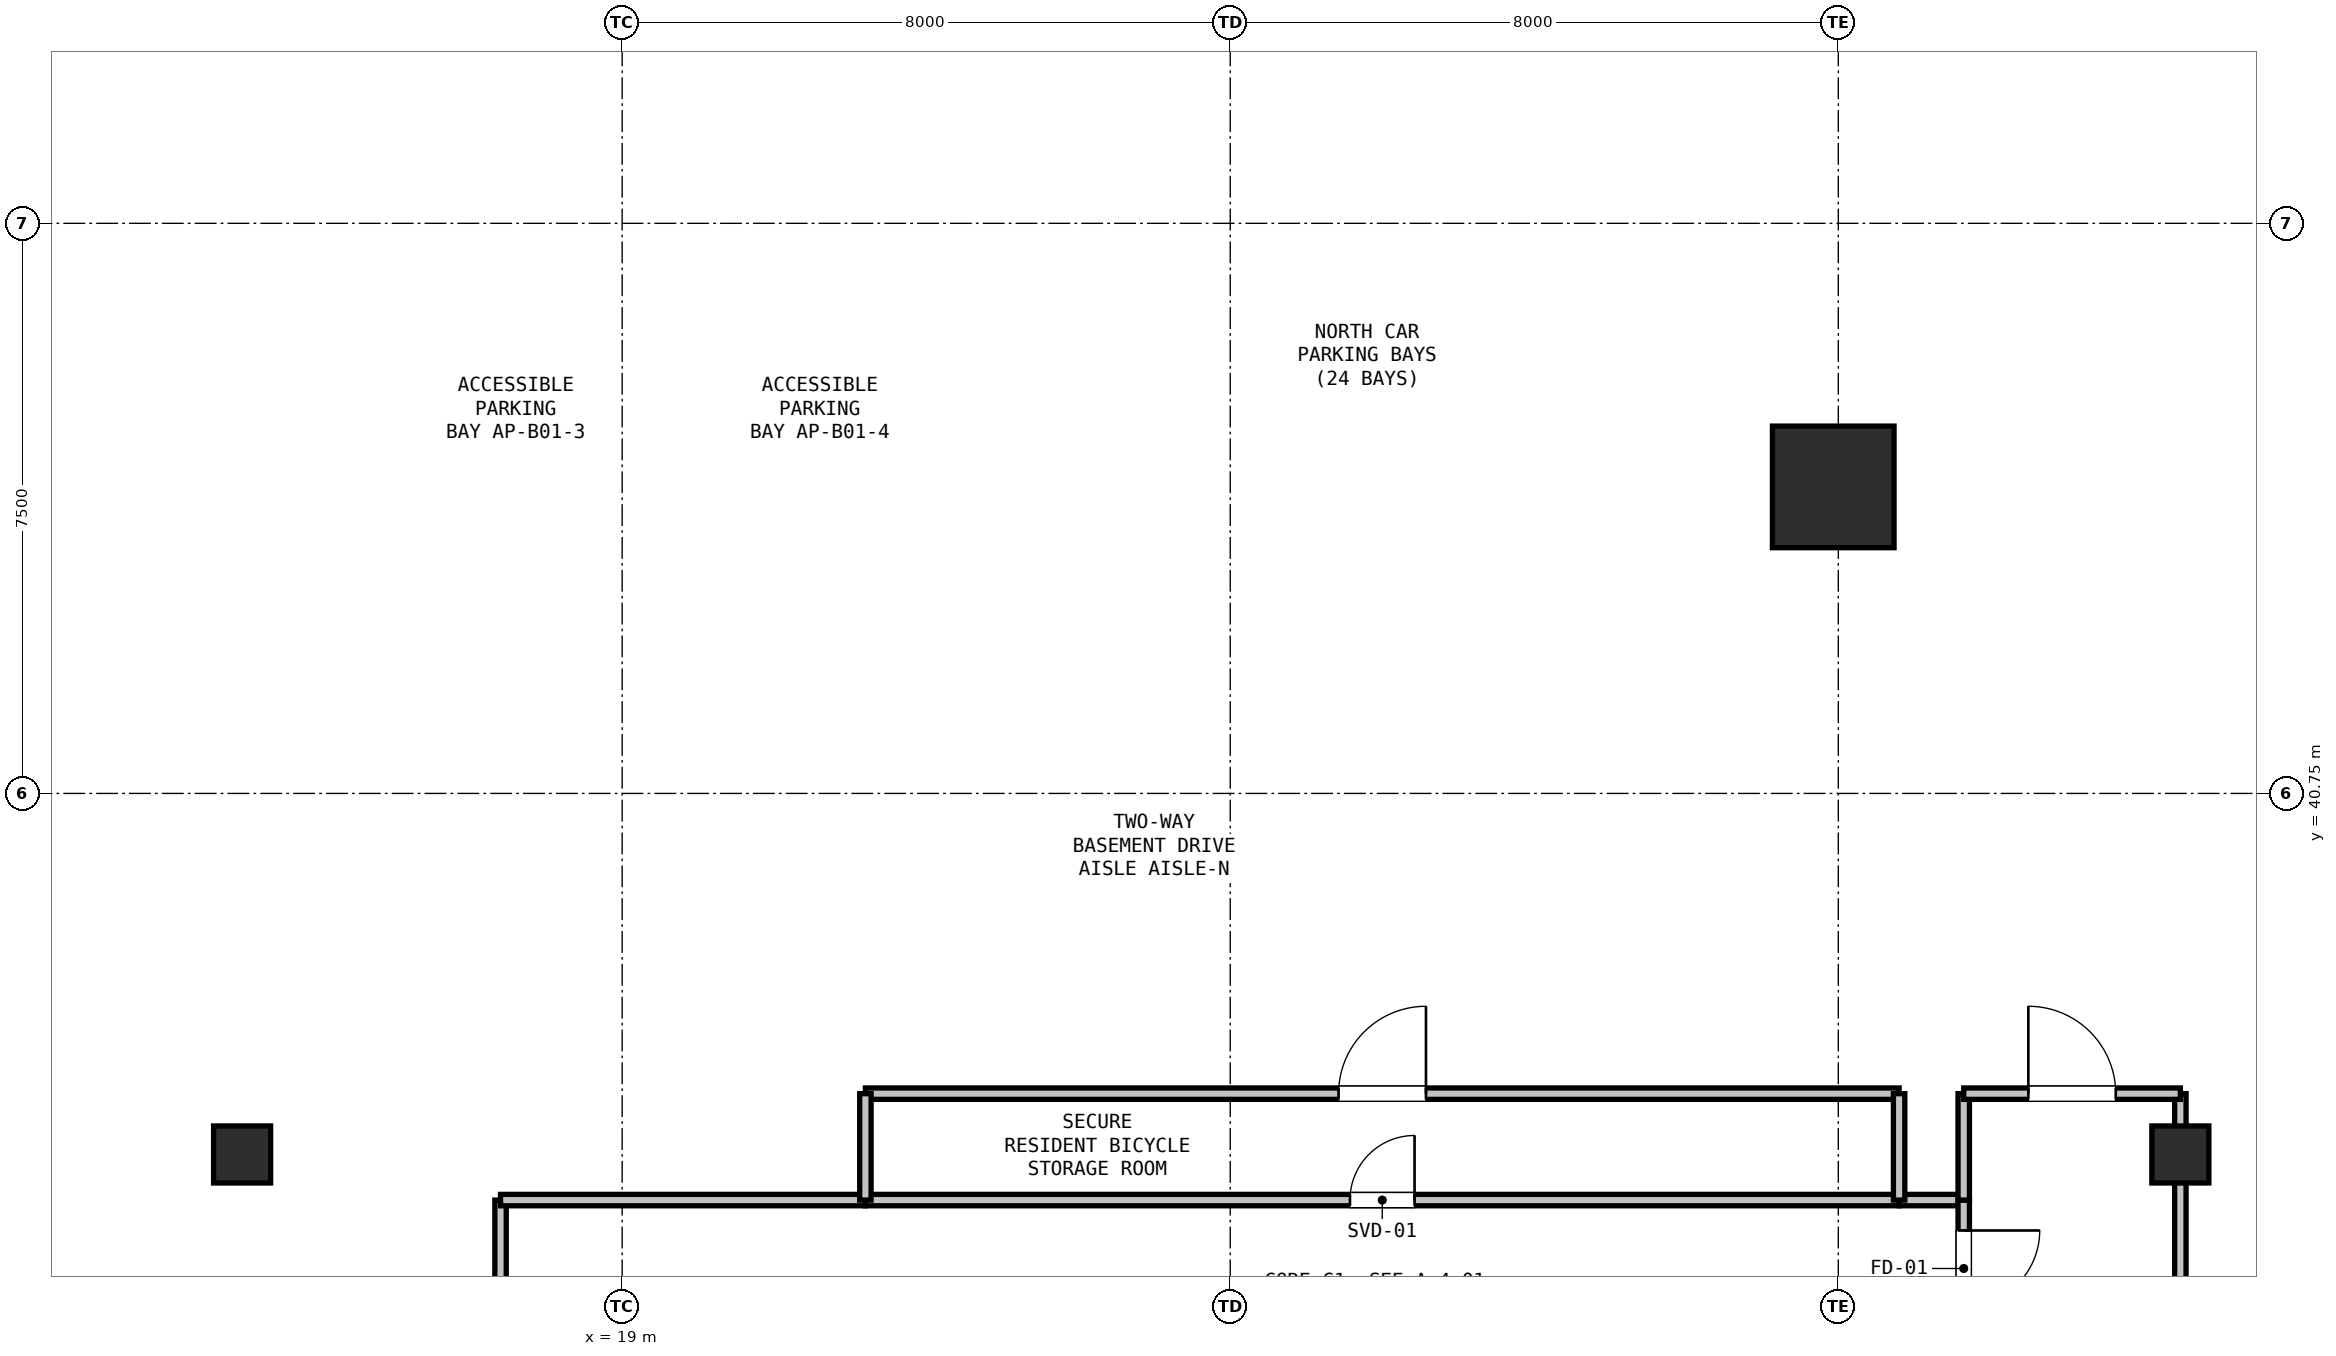
"""IFC4 building model, lengths in metres.
Left out: names, types, materials, properties, quantities, classifications, styles, units other than length and angle.
Written with IfcOpenShell. Run it as: python <this file> out.ifc"""

import sys

from ifc_helpers import new_model, si_unit, direction, frame, frame_2d, origin, origin_2d, place, context, subcontext, project, spatial, rectangle, hollow_rectangle, extrude, element, fill, save


model = new_model("IFC4")
c1 = context("Model", 3, precision=1e-05, world=origin(), true_north=direction((0.0, 1.0)))
c2 = subcontext(c1, "Body", "Model", "MODEL_VIEW")
j1 = project(units=[si_unit("LENGTHUNIT", "METRE"), si_unit("PLANEANGLEUNIT", "RADIAN")], contexts=[c1])
p1 = place(None, origin())
s1 = spatial("IfcSite", under=j1, at=p1, CompositionType="ELEMENT")
p2 = place(p1, origin())
s2 = spatial("IfcBuilding", under=s1, at=p2, CompositionType="ELEMENT")
p3 = place(p2, frame((0.0, 0.0, -4.5)))
s3 = spatial("IfcBuildingStorey", under=s2, at=p3, CompositionType="ELEMENT", Elevation=-4.5)
p4 = place(p3, frame((34.933, 44.783, 0.0), z_axis=(0.0, 0.0, 1.0), x_axis=(1.0, 0.0, 0.0)))
e1 = element("IfcColumn", 1, at=p4, inside=s3, PredefinedType="COLUMN", context=c2, shape_type="SweptSolid", body=[
    extrude(hollow_rectangle(XDim=1.6, YDim=1.6, WallThickness=0.04, at=origin_2d()), origin(), (0.0, 0.0, 1.0), 4.5),
])
for number, where, z_axis, x_axis in (
    (2, (14.0, 36.0, 0.0), (0.0, 0.0, 1.0), (1.0, 0.0, 0.0)),
    (3, (39.5, 36.0, 0.0), (0.0, 0.0, 1.0), (1.0, 0.0, 0.0)),
):
    element("IfcColumn", number, at=place(p3, frame(where, z_axis=z_axis, x_axis=x_axis)), inside=s3, PredefinedType="COLUMN", context=c2, shape_type="SweptSolid", body=[
        extrude(rectangle(XDim=0.75, YDim=0.75, at=origin_2d()), origin(), (0.0, 0.0, 1.0), 4.5),
    ])
p5 = place(p3, frame((17.4, 16.7, 0.0), z_axis=(0.0, 0.0, 1.0), x_axis=(0.0, 1.0, 0.0)))
e4 = element("IfcWall", 4, at=p5, inside=s3, PredefinedType="PARTITIONING", context=c2, shape_type="SweptSolid", body=[
    extrude(rectangle(XDim=18.7, YDim=0.15, at=frame_2d((9.35, 0.0))), origin(), (0.0, 0.0, 1.0), 4.2),
])
p6 = place(p5, frame((1.725, 0.0, 0.0)))
e5 = element("IfcOpeningElement", 5, at=p6, cuts=e4, PredefinedType="OPENING", context=c2, shape_type="SweptSolid", body=[
    extrude(rectangle(XDim=1.15, YDim=2.15, at=frame_2d((0.575, 1.075))), frame((0.0, 0.085, 0.0), z_axis=(0.0, -1.0, 0.0), x_axis=(1.0, 0.0, 0.0)), (0.0, 0.0, 1.0), 0.17),
])
p7 = place(p5, frame((5.347, 0.0, 0.0)))
e6 = element("IfcOpeningElement", 6, at=p7, cuts=e4, PredefinedType="OPENING", context=c2, shape_type="SweptSolid", body=[
    extrude(rectangle(XDim=1.15, YDim=2.15, at=frame_2d((0.575, 1.075))), frame((0.0, 0.085, 0.0), z_axis=(0.0, -1.0, 0.0), x_axis=(1.0, 0.0, 0.0)), (0.0, 0.0, 1.0), 0.17),
])
p8 = place(p3, frame((17.4, 35.4, 0.0), z_axis=(0.0, 0.0, 1.0), x_axis=(1.0, 0.0, 0.0)))
e7 = element("IfcWall", 7, at=p8, inside=s3, PredefinedType="PARTITIONING", context=c2, shape_type="SweptSolid", body=[
    extrude(rectangle(XDim=4.8, YDim=0.15, at=frame_2d((2.4, 0.0))), origin(), (0.0, 0.0, 1.0), 4.2),
])
p9 = place(p3, frame((22.2, 35.4, 0.0), z_axis=(0.0, 0.0, 1.0), x_axis=(1.0, 0.0, 0.0)))
e8 = element("IfcWall", 8, at=p9, inside=s3, PredefinedType="PARTITIONING", context=c2, shape_type="SweptSolid", body=[
    extrude(rectangle(XDim=13.6, YDim=0.15, at=frame_2d((6.8, 0.0))), origin(), (0.0, 0.0, 1.0), 4.2),
])
p10 = place(p9, frame((6.375, 0.0, 0.0)))
e9 = element("IfcOpeningElement", 9, at=p10, cuts=e8, PredefinedType="OPENING", context=c2, shape_type="SweptSolid", body=[
    extrude(rectangle(XDim=0.85, YDim=2.1, at=frame_2d((0.425, 1.05))), frame((0.0, 0.085, 0.0), z_axis=(0.0, -1.0, 0.0), x_axis=(1.0, 0.0, 0.0)), (0.0, 0.0, 1.0), 0.17),
])
p11 = place(p3, frame((35.8, 35.4, 0.0), z_axis=(0.0, 0.0, 1.0), x_axis=(1.0, 0.0, 0.0)))
e10 = element("IfcWall", 10, at=p11, inside=s3, PredefinedType="PARTITIONING", context=c2, shape_type="SweptSolid", body=[
    extrude(rectangle(XDim=0.85, YDim=0.15, at=frame_2d((0.425, 0.0))), origin(), (0.0, 0.0, 1.0), 4.2),
])
p12 = place(p3, frame((36.65, 35.4, 0.0), z_axis=(0.0, 0.0, 1.0), x_axis=(0.0, -1.0, 0.0)))
e11 = element("IfcWall", 11, at=p12, inside=s3, PredefinedType="PARTITIONING", context=c2, shape_type="SweptSolid", body=[
    extrude(rectangle(XDim=1.8, YDim=0.15, at=frame_2d((0.9, 0.0))), origin(), (0.0, 0.0, 1.0), 4.2),
])
p13 = place(p12, frame((0.4, 0.0, 0.0)))
e12 = element("IfcOpeningElement", 12, at=p13, cuts=e11, PredefinedType="OPENING", context=c2, shape_type="SweptSolid", body=[
    extrude(rectangle(XDim=1.0, YDim=2.15, at=frame_2d((0.5, 1.075))), frame((0.0, 0.085, 0.0), z_axis=(0.0, -1.0, 0.0), x_axis=(1.0, 0.0, 0.0)), (0.0, 0.0, 1.0), 0.17),
])
p14 = place(p3, frame((39.5, 36.8, 0.0), z_axis=(0.0, 0.0, 1.0), x_axis=(0.0, -1.0, 0.0)))
e13 = element("IfcWall", 13, at=p14, inside=s3, PredefinedType="PARTITIONING", context=c2, shape_type="SweptSolid", body=[
    extrude(rectangle(XDim=20.1, YDim=0.15, at=frame_2d((10.05, 0.0))), origin(), (0.0, 0.0, 1.0), 4.2),
])
p15 = place(p14, frame((10.884, 0.0, 0.0)))
e14 = element("IfcOpeningElement", 14, at=p15, cuts=e13, PredefinedType="OPENING", context=c2, shape_type="SweptSolid", body=[
    extrude(rectangle(XDim=1.15, YDim=2.15, at=frame_2d((0.575, 1.075))), frame((0.0, 0.085, 0.0), z_axis=(0.0, -1.0, 0.0), x_axis=(1.0, 0.0, 0.0)), (0.0, 0.0, 1.0), 0.17),
])
p16 = place(p3, frame((36.65, 35.4, 0.0), z_axis=(0.0, 0.0, 1.0), x_axis=(0.0, 1.0, 0.0)))
e15 = element("IfcWall", 15, at=p16, inside=s3, PredefinedType="PARTITIONING", context=c2, shape_type="SweptSolid", body=[
    extrude(rectangle(XDim=1.4, YDim=0.15, at=frame_2d((0.7, 0.0))), origin(), (0.0, 0.0, 1.0), 4.2),
])
p17 = place(p3, frame((36.65, 36.8, 0.0), z_axis=(0.0, 0.0, 1.0), x_axis=(1.0, 0.0, 0.0)))
e16 = element("IfcWall", 16, at=p17, inside=s3, PredefinedType="PARTITIONING", context=c2, shape_type="SweptSolid", body=[
    extrude(rectangle(XDim=2.85, YDim=0.15, at=frame_2d((1.425, 0.0))), origin(), (0.0, 0.0, 1.0), 4.2),
])
p18 = place(p17, frame((0.85, 0.0, 0.0)))
e17 = element("IfcOpeningElement", 17, at=p18, cuts=e16, PredefinedType="OPENING", context=c2, shape_type="SweptSolid", body=[
    extrude(rectangle(XDim=1.15, YDim=2.15, at=frame_2d((0.575, 1.075))), frame((0.0, 0.085, 0.0), z_axis=(0.0, -1.0, 0.0), x_axis=(1.0, 0.0, 0.0)), (0.0, 0.0, 1.0), 0.17),
])
p19 = place(p3, frame((22.2, 36.8, 0.0), z_axis=(0.0, 0.0, 1.0), x_axis=(1.0, 0.0, 0.0)))
e18 = element("IfcWall", 18, at=p19, inside=s3, PredefinedType="PARTITIONING", context=c2, shape_type="SweptSolid", body=[
    extrude(rectangle(XDim=13.6, YDim=0.15, at=frame_2d((6.8, 0.0))), origin(), (0.0, 0.0, 1.0), 4.2),
])
p20 = place(p19, frame((6.225, 0.0, 0.0)))
e19 = element("IfcOpeningElement", 19, at=p20, cuts=e18, PredefinedType="OPENING", context=c2, shape_type="SweptSolid", body=[
    extrude(rectangle(XDim=1.15, YDim=2.15, at=frame_2d((0.575, 1.075))), frame((0.0, 0.085, 0.0), z_axis=(0.0, -1.0, 0.0), x_axis=(1.0, 0.0, 0.0)), (0.0, 0.0, 1.0), 0.17),
])
for number, where, z_axis, x_axis in (
    (20, (35.8, 36.8, 0.0), (0.0, 0.0, 1.0), (0.0, -1.0, 0.0)),
    (21, (22.2, 35.4, 0.0), (0.0, 0.0, 1.0), (0.0, 1.0, 0.0)),
):
    element("IfcWall", number, at=place(p3, frame(where, z_axis=z_axis, x_axis=x_axis)), inside=s3, PredefinedType="PARTITIONING", context=c2, shape_type="SweptSolid", body=[
        extrude(rectangle(XDim=1.4, YDim=0.15, at=frame_2d((0.7, 0.0))), origin(), (0.0, 0.0, 1.0), 4.2),
    ])
p21 = place(p13, origin())
e22 = element("IfcDoor", 22, at=p21, inside=s3, OperationType="SINGLE_SWING_LEFT", PredefinedType="DOOR", context=c2, shape_type="SweptSolid", body=[
    extrude(rectangle(XDim=1.0, YDim=2.15, at=frame_2d((0.5, 1.075))), frame((0.0, 0.025, 0.0), z_axis=(0.0, -1.0, 0.0), x_axis=(1.0, 0.0, 0.0)), (0.0, 0.0, 1.0), 0.05),
])
fill(e12, e22)
p22 = place(p10, origin())
e23 = element("IfcDoor", 23, at=p22, inside=s3, OperationType="SINGLE_SWING_RIGHT", PredefinedType="DOOR", context=c2, shape_type="SweptSolid", body=[
    extrude(rectangle(XDim=0.85, YDim=2.1, at=frame_2d((0.425, 1.05))), frame((0.0, 0.025, 0.0), z_axis=(0.0, -1.0, 0.0), x_axis=(1.0, 0.0, 0.0)), (0.0, 0.0, 1.0), 0.05),
])
fill(e9, e23)
p23 = place(p18, origin())
e24 = element("IfcDoor", 24, at=p23, inside=s3, OperationType="SINGLE_SWING_LEFT", PredefinedType="DOOR", context=c2, shape_type="SweptSolid", body=[
    extrude(rectangle(XDim=1.15, YDim=2.15, at=frame_2d((0.575, 1.075))), frame((0.0, 0.025, 0.0), z_axis=(0.0, -1.0, 0.0), x_axis=(1.0, 0.0, 0.0)), (0.0, 0.0, 1.0), 0.05),
])
fill(e17, e24)
p24 = place(p20, origin())
e25 = element("IfcDoor", 25, at=p24, inside=s3, OperationType="SINGLE_SWING_RIGHT", PredefinedType="DOOR", context=c2, shape_type="SweptSolid", body=[
    extrude(rectangle(XDim=1.15, YDim=2.15, at=frame_2d((0.575, 1.075))), frame((0.0, 0.025, 0.0), z_axis=(0.0, -1.0, 0.0), x_axis=(1.0, 0.0, 0.0)), (0.0, 0.0, 1.0), 0.05),
])
fill(e19, e25)
save(model, sys.argv[1])
